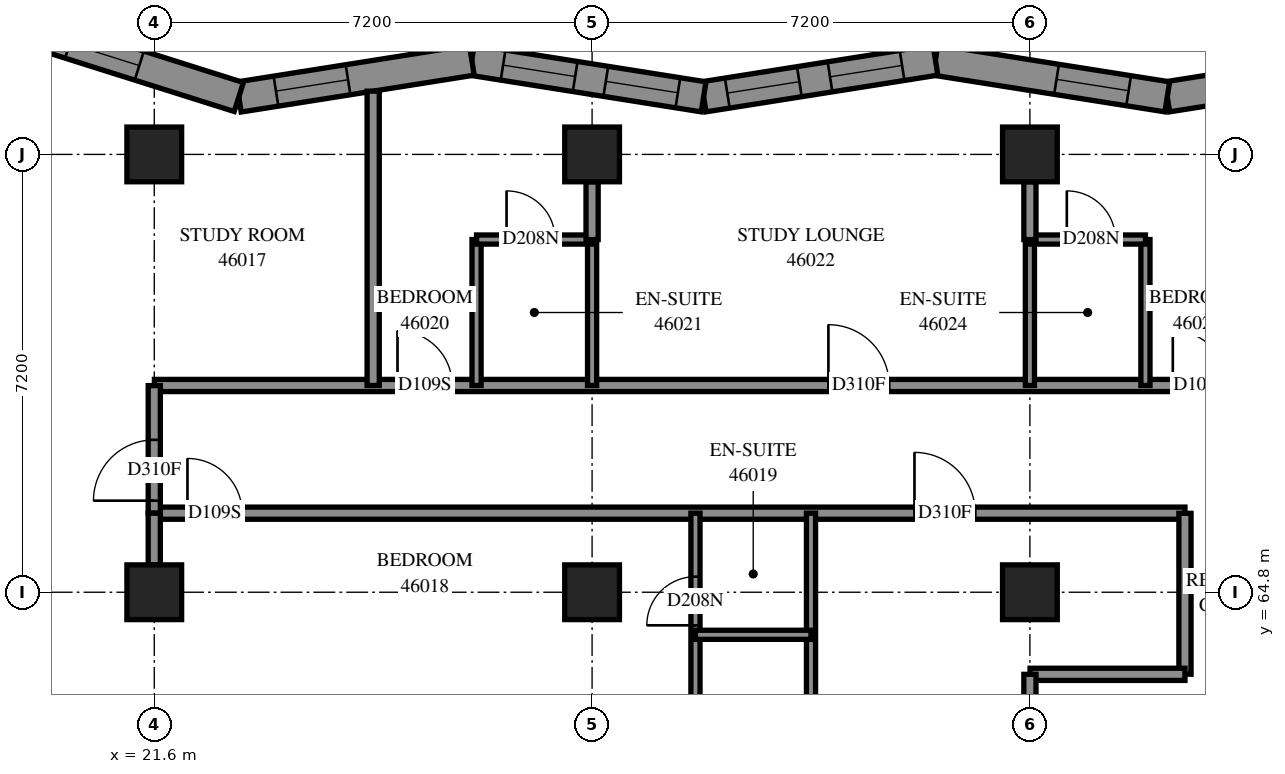
"""IFC4 building model, lengths in metres.
Left out: names, types, materials, properties, quantities, classifications, styles, units other than length and angle.
Written with IfcOpenShell. Run it as: python <this file> out.ifc"""

import sys

from ifc_helpers import new_model, si_unit, direction, frame, frame_2d, origin, origin_2d, place, context, subcontext, project, spatial, polyline, rectangle, outline, extrude, element, fill, save


model = new_model("IFC4")
c1 = context("Model", 3, precision=1e-05, world=origin(), true_north=direction((0.0, 1.0)))
c2 = subcontext(c1, "Body", "Model", "MODEL_VIEW")
j1 = project(units=[si_unit("LENGTHUNIT", "METRE"), si_unit("PLANEANGLEUNIT", "RADIAN")], contexts=[c1])
p1 = place(None, origin())
s1 = spatial("IfcSite", under=j1, at=p1, CompositionType="ELEMENT")
p2 = place(p1, origin())
s2 = spatial("IfcBuilding", under=s1, at=p2, CompositionType="ELEMENT")
p3 = place(p2, frame((0.0, 0.0, 169.4)))
s3 = spatial("IfcBuildingStorey", under=s2, at=p3, CompositionType="ELEMENT", Elevation=169.4)
for number, where, z_axis, x_axis in (
    (1, (21.6, 64.8, 0.0), (0.0, 0.0, 1.0), (1.0, 0.0, 0.0)),
    (2, (21.6, 72.0, 0.0), (0.0, 0.0, 1.0), (1.0, 0.0, 0.0)),
    (3, (28.8, 64.8, 0.0), (0.0, 0.0, 1.0), (1.0, 0.0, 0.0)),
    (4, (28.8, 72.0, 0.0), (0.0, 0.0, 1.0), (1.0, 0.0, 0.0)),
    (5, (36.0, 64.8, 0.0), (0.0, 0.0, 1.0), (1.0, 0.0, 0.0)),
    (6, (36.0, 72.0, 0.0), (0.0, 0.0, 1.0), (1.0, 0.0, 0.0)),
):
    element("IfcColumn", number, at=place(p3, frame(where, z_axis=z_axis, x_axis=x_axis)), inside=s3, PredefinedType="COLUMN", context=c2, shape_type="SweptSolid", body=[
        extrude(rectangle(XDim=0.9, YDim=0.9, at=origin_2d()), origin(), (0.0, 0.0, 1.0), 3.1),
    ])
p4 = place(p3, frame((42.071, 73.55, 0.0), z_axis=(0.0, 0.0, 1.0), x_axis=(-0.9877213372, -0.1562259905, 0.0)))
e7 = element("IfcWall", 7, at=p4, inside=s3, PredefinedType="SOLIDWALL", context=c2, shape_type="SweptSolid", body=[
    extrude(outline(polyline([(-0.04, -0.25), (3.82, -0.25), (3.899, 0.25), (0.04, 0.25), (-0.04, -0.25)])), origin(), (0.0, 0.0, 1.0), 3.1),
])
p5 = place(p4, frame((0.771, 0.0, 0.45)))
e8 = element("IfcOpeningElement", 8, at=p5, cuts=e7, PredefinedType="OPENING", context=c2, shape_type="SweptSolid", body=[
    extrude(rectangle(XDim=1.2, YDim=2.5, at=frame_2d((0.6, 1.25))), frame((0.0, 0.26, 0.0), z_axis=(0.0, -1.0, 0.0), x_axis=(1.0, 0.0, 0.0)), (0.0, 0.0, 1.0), 0.52),
])
p6 = place(p3, frame((38.259, 72.947, 0.0), z_axis=(0.0, 0.0, 1.0), x_axis=(-0.9877213372, 0.1562259905, 0.0)))
e9 = element("IfcWall", 9, at=p6, inside=s3, PredefinedType="SOLIDWALL", context=c2, shape_type="SweptSolid", body=[
    extrude(outline(polyline([(0.04, -0.25), (3.899, -0.25), (3.82, 0.25), (-0.04, 0.25), (0.04, -0.25)])), origin(), (0.0, 0.0, 1.0), 3.1),
])
p7 = place(p6, frame((0.643, 0.0, 0.45)))
e10 = element("IfcOpeningElement", 10, at=p7, cuts=e9, PredefinedType="OPENING", context=c2, shape_type="SweptSolid", body=[
    extrude(rectangle(XDim=1.2, YDim=2.5, at=frame_2d((0.6, 1.25))), frame((0.0, 0.26, 0.0), z_axis=(0.0, -1.0, 0.0), x_axis=(1.0, 0.0, 0.0)), (0.0, 0.0, 1.0), 0.52),
])
p8 = place(p3, frame((34.447, 73.55, 0.0), z_axis=(0.0, 0.0, 1.0), x_axis=(-0.9877213372, -0.1562259905, 0.0)))
e11 = element("IfcWall", 11, at=p8, inside=s3, PredefinedType="SOLIDWALL", context=c2, shape_type="SweptSolid", body=[
    extrude(outline(polyline([(-0.04, -0.25), (3.82, -0.25), (3.899, 0.25), (0.04, 0.25), (-0.04, -0.25)])), origin(), (0.0, 0.0, 1.0), 3.1),
])
p9 = place(p8, frame((0.556, 0.0, 0.45)))
e12 = element("IfcOpeningElement", 12, at=p9, cuts=e11, PredefinedType="OPENING", context=c2, shape_type="SweptSolid", body=[
    extrude(rectangle(XDim=1.2, YDim=2.5, at=frame_2d((0.6, 1.25))), frame((0.0, 0.26, 0.0), z_axis=(0.0, -1.0, 0.0), x_axis=(1.0, 0.0, 0.0)), (0.0, 0.0, 1.0), 0.52),
])
p10 = place(p8, frame((2.266, 0.0, 0.45)))
e13 = element("IfcOpeningElement", 13, at=p10, cuts=e11, PredefinedType="OPENING", context=c2, shape_type="SweptSolid", body=[
    extrude(rectangle(XDim=1.2, YDim=2.5, at=frame_2d((0.6, 1.25))), frame((0.0, 0.26, 0.0), z_axis=(0.0, -1.0, 0.0), x_axis=(1.0, 0.0, 0.0)), (0.0, 0.0, 1.0), 0.52),
])
p11 = place(p3, frame((30.634, 72.947, 0.0), z_axis=(0.0, 0.0, 1.0), x_axis=(-0.9877213372, 0.1562259905, 0.0)))
e14 = element("IfcWall", 14, at=p11, inside=s3, PredefinedType="SOLIDWALL", context=c2, shape_type="SweptSolid", body=[
    extrude(outline(polyline([(0.04, -0.25), (3.899, -0.25), (3.82, 0.25), (-0.04, 0.25), (0.04, -0.25)])), origin(), (0.0, 0.0, 1.0), 3.1),
])
p12 = place(p11, frame((0.428, 0.0, 0.45)))
e15 = element("IfcOpeningElement", 15, at=p12, cuts=e14, PredefinedType="OPENING", context=c2, shape_type="SweptSolid", body=[
    extrude(rectangle(XDim=1.2, YDim=2.5, at=frame_2d((0.6, 1.25))), frame((0.0, 0.26, 0.0), z_axis=(0.0, -1.0, 0.0), x_axis=(1.0, 0.0, 0.0)), (0.0, 0.0, 1.0), 0.52),
])
p13 = place(p11, frame((2.139, 0.0, 0.45)))
e16 = element("IfcOpeningElement", 16, at=p13, cuts=e14, PredefinedType="OPENING", context=c2, shape_type="SweptSolid", body=[
    extrude(rectangle(XDim=1.2, YDim=2.5, at=frame_2d((0.6, 1.25))), frame((0.0, 0.26, 0.0), z_axis=(0.0, -1.0, 0.0), x_axis=(1.0, 0.0, 0.0)), (0.0, 0.0, 1.0), 0.52),
])
p14 = place(p3, frame((26.822, 73.55, 0.0), z_axis=(0.0, 0.0, 1.0), x_axis=(-0.9877221729, -0.1562207065, 0.0)))
e17 = element("IfcWall", 17, at=p14, inside=s3, PredefinedType="SOLIDWALL", context=c2, shape_type="SweptSolid", body=[
    extrude(outline(polyline([(-0.04, -0.25), (3.82, -0.25), (3.938, 0.25), (0.04, 0.25), (-0.04, -0.25)])), origin(), (0.0, 0.0, 1.0), 3.1),
])
p15 = place(p14, frame((2.061, 0.0, 0.45)))
e18 = element("IfcOpeningElement", 18, at=p15, cuts=e17, PredefinedType="OPENING", context=c2, shape_type="SweptSolid", body=[
    extrude(rectangle(XDim=1.2, YDim=2.5, at=frame_2d((0.6, 1.25))), frame((0.0, 0.26, 0.0), z_axis=(0.0, -1.0, 0.0), x_axis=(1.0, 0.0, 0.0)), (0.0, 0.0, 1.0), 0.52),
])
p16 = place(p3, frame((22.99, 72.944, 0.0), z_axis=(0.0, 0.0, 1.0), x_axis=(-0.9536473183, 0.3009265562, 0.0)))
e19 = element("IfcWall", 19, at=p16, inside=s3, PredefinedType="SOLIDWALL", context=c2, shape_type="SweptSolid", body=[
    extrude(outline(polyline([(0.059, -0.25), (4.057, -0.25), (3.374, 0.25), (-0.059, 0.25), (0.059, -0.25)])), origin(), (0.0, 0.0, 1.0), 3.1),
])
p17 = place(p16, frame((1.716, 0.0, 0.45)))
e20 = element("IfcOpeningElement", 20, at=p17, cuts=e19, PredefinedType="OPENING", context=c2, shape_type="SweptSolid", body=[
    extrude(rectangle(XDim=1.2, YDim=2.5, at=frame_2d((0.6, 1.25))), frame((0.0, 0.26, 0.0), z_axis=(0.0, -1.0, 0.0), x_axis=(1.0, 0.0, 0.0)), (0.0, 0.0, 1.0), 0.52),
])
p18 = place(p3, frame((21.602, 68.2, 0.0), z_axis=(0.0, 0.0, 1.0), x_axis=(1.0, 0.0, 0.0)))
e21 = element("IfcWall", 21, at=p18, inside=s3, PredefinedType="PARTITIONING", context=c2, shape_type="SweptSolid", body=[
    extrude(rectangle(XDim=19.048, YDim=0.2, at=frame_2d((9.524, 0.0))), origin(), (0.0, 0.0, 1.0), 3.1),
])
p19 = place(p18, frame((3.998, 0.0, 0.0)))
e22 = element("IfcOpeningElement", 22, at=p19, cuts=e21, PredefinedType="OPENING", context=c2, shape_type="SweptSolid", body=[
    extrude(rectangle(XDim=0.9, YDim=2.1, at=frame_2d((0.45, 1.05))), frame((0.0, 0.11, 0.0), z_axis=(0.0, -1.0, 0.0), x_axis=(1.0, 0.0, 0.0)), (0.0, 0.0, 1.0), 0.22),
])
p20 = place(p18, frame((11.084, 0.0, 0.0)))
e23 = element("IfcOpeningElement", 23, at=p20, cuts=e21, PredefinedType="OPENING", context=c2, shape_type="SweptSolid", body=[
    extrude(rectangle(XDim=1.0, YDim=2.1, at=frame_2d((0.5, 1.05))), frame((0.0, 0.11, 0.0), z_axis=(0.0, -1.0, 0.0), x_axis=(1.0, 0.0, 0.0)), (0.0, 0.0, 1.0), 0.22),
])
p21 = place(p18, frame((16.748, 0.0, 0.0)))
e24 = element("IfcOpeningElement", 24, at=p21, cuts=e21, PredefinedType="OPENING", context=c2, shape_type="SweptSolid", body=[
    extrude(rectangle(XDim=0.9, YDim=2.1, at=frame_2d((0.45, 1.05))), frame((0.0, 0.11, 0.0), z_axis=(0.0, -1.0, 0.0), x_axis=(1.0, 0.0, 0.0)), (0.0, 0.0, 1.0), 0.22),
])
p22 = place(p3, frame((21.6, 66.1, 0.0), z_axis=(0.0, 0.0, 1.0), x_axis=(1.0, 0.0, 0.0)))
e25 = element("IfcWall", 25, at=p22, inside=s3, PredefinedType="PARTITIONING", context=c2, shape_type="SweptSolid", body=[
    extrude(rectangle(XDim=16.95, YDim=0.2, at=frame_2d((8.475, 0.0))), origin(), (0.0, 0.0, 1.0), 3.1),
])
p23 = place(p22, frame((0.546, 0.0, 0.0)))
e26 = element("IfcOpeningElement", 26, at=p23, cuts=e25, PredefinedType="OPENING", context=c2, shape_type="SweptSolid", body=[
    extrude(rectangle(XDim=0.9, YDim=2.1, at=frame_2d((0.45, 1.05))), frame((0.0, 0.11, 0.0), z_axis=(0.0, -1.0, 0.0), x_axis=(1.0, 0.0, 0.0)), (0.0, 0.0, 1.0), 0.22),
])
p24 = place(p22, frame((12.502, 0.0, 0.0)))
e27 = element("IfcOpeningElement", 27, at=p24, cuts=e25, PredefinedType="OPENING", context=c2, shape_type="SweptSolid", body=[
    extrude(rectangle(XDim=1.0, YDim=2.1, at=frame_2d((0.5, 1.05))), frame((0.0, 0.11, 0.0), z_axis=(0.0, -1.0, 0.0), x_axis=(1.0, 0.0, 0.0)), (0.0, 0.0, 1.0), 0.22),
])
p25 = place(p3, frame((25.2, 68.2, 0.0), z_axis=(0.0, 0.0, 1.0), x_axis=(0.0, 1.0, 0.0)))
e28 = element("IfcWall", 28, at=p25, inside=s3, PredefinedType="PARTITIONING", context=c2, shape_type="SweptSolid", body=[
    extrude(rectangle(XDim=4.84, YDim=0.2, at=frame_2d((2.42, 0.0))), origin(), (0.0, 0.0, 1.0), 3.1),
])
p26 = place(p3, frame((32.4, 62.897, 0.0), z_axis=(0.0, 0.0, 1.0), x_axis=(0.0, 1.0, 0.0)))
e29 = element("IfcWall", 29, at=p26, inside=s3, PredefinedType="PARTITIONING", context=c2, shape_type="SweptSolid", body=[
    extrude(rectangle(XDim=3.203, YDim=0.15, at=frame_2d((1.601, 0.0))), origin(), (0.0, 0.0, 1.0), 3.1),
])
p27 = place(p3, frame((30.5, 62.897, 0.0), z_axis=(0.0, 0.0, 1.0), x_axis=(0.0, 1.0, 0.0)))
e30 = element("IfcWall", 30, at=p27, inside=s3, PredefinedType="PARTITIONING", context=c2, shape_type="SweptSolid", body=[
    extrude(rectangle(XDim=3.203, YDim=0.15, at=frame_2d((1.601, 0.0))), origin(), (0.0, 0.0, 1.0), 3.1),
])
p28 = place(p27, frame((1.359, 0.0, 0.0)))
e31 = element("IfcOpeningElement", 31, at=p28, cuts=e30, PredefinedType="OPENING", context=c2, shape_type="SweptSolid", body=[
    extrude(rectangle(XDim=0.8, YDim=2.1, at=frame_2d((0.4, 1.05))), frame((0.0, 0.085, 0.0), z_axis=(0.0, -1.0, 0.0), x_axis=(1.0, 0.0, 0.0)), (0.0, 0.0, 1.0), 0.17),
])
p29 = place(p3, frame((38.55, 63.452, 0.0), z_axis=(0.0, 0.0, 1.0), x_axis=(0.0, 1.0, 0.0)))
e32 = element("IfcWall", 32, at=p29, inside=s3, PredefinedType="PARTITIONING", context=c2, shape_type="SweptSolid", body=[
    extrude(rectangle(XDim=2.646, YDim=0.2, at=frame_2d((1.323, 0.0))), origin(), (0.0, 0.0, 1.0), 3.1),
])
p30 = place(p3, frame((36.002, 63.45, 0.0), z_axis=(0.0, 0.0, 1.0), x_axis=(1.0, 0.0, 0.0)))
e33 = element("IfcWall", 33, at=p30, inside=s3, PredefinedType="PARTITIONING", context=c2, shape_type="SweptSolid", body=[
    extrude(rectangle(XDim=2.548, YDim=0.2, at=frame_2d((1.274, 0.0))), origin(), (0.0, 0.0, 1.0), 3.1),
])
for number, where, z_axis, x_axis in (
    (34, (26.9, 68.2, 0.0), (0.0, 0.0, 1.0), (0.0, 1.0, 0.0)),
    (35, (28.8, 68.2, 0.0), (0.0, 0.0, 1.0), (0.0, 1.0, 0.0)),
    (36, (37.9, 68.2, 0.0), (0.0, 0.0, 1.0), (0.0, 1.0, 0.0)),
    (37, (36.0, 68.2, 0.0), (0.0, 0.0, 1.0), (0.0, 1.0, 0.0)),
):
    element("IfcWall", number, at=place(p3, frame(where, z_axis=z_axis, x_axis=x_axis)), inside=s3, PredefinedType="PARTITIONING", context=c2, shape_type="SweptSolid", body=[
        extrude(rectangle(XDim=2.4, YDim=0.15, at=frame_2d((1.2, 0.0))), origin(), (0.0, 0.0, 1.0), 3.1),
    ])
p31 = place(p3, frame((36.0, 61.35, 0.0), z_axis=(0.0, 0.0, 1.0), x_axis=(0.0, 1.0, 0.0)))
e38 = element("IfcWall", 38, at=p31, inside=s3, PredefinedType="PARTITIONING", context=c2, shape_type="SweptSolid", body=[
    extrude(rectangle(XDim=2.1, YDim=0.2, at=frame_2d((1.05, 0.0))), origin(), (0.0, 0.0, 1.0), 2.6),
])
p32 = place(p3, frame((21.6, 66.1, 0.0), z_axis=(0.0, 0.0, 1.0), x_axis=(0.0, 1.0, 0.0)))
e39 = element("IfcWall", 39, at=p32, inside=s3, PredefinedType="PARTITIONING", context=c2, shape_type="SweptSolid", body=[
    extrude(rectangle(XDim=2.098, YDim=0.2, at=frame_2d((1.049, 0.0))), origin(), (0.0, 0.0, 1.0), 2.6),
])
p33 = place(p32, frame((0.206, 0.0, 0.0)))
e40 = element("IfcOpeningElement", 40, at=p33, cuts=e39, PredefinedType="OPENING", context=c2, shape_type="SweptSolid", body=[
    extrude(rectangle(XDim=1.0, YDim=2.1, at=frame_2d((0.5, 1.05))), frame((0.0, 0.11, 0.0), z_axis=(0.0, -1.0, 0.0), x_axis=(1.0, 0.0, 0.0)), (0.0, 0.0, 1.0), 0.22),
])
p34 = place(p3, frame((26.9, 70.6, 0.0), z_axis=(0.0, 0.0, 1.0), x_axis=(1.0, 0.0, 0.0)))
e41 = element("IfcWall", 41, at=p34, inside=s3, PredefinedType="PARTITIONING", context=c2, shape_type="SweptSolid", body=[
    extrude(rectangle(XDim=1.9, YDim=0.15, at=frame_2d((0.95, 0.0))), origin(), (0.0, 0.0, 1.0), 3.1),
])
p35 = place(p34, frame((0.493, 0.0, 0.0)))
e42 = element("IfcOpeningElement", 42, at=p35, cuts=e41, PredefinedType="OPENING", context=c2, shape_type="SweptSolid", body=[
    extrude(rectangle(XDim=0.8, YDim=2.1, at=frame_2d((0.4, 1.05))), frame((0.0, 0.085, 0.0), z_axis=(0.0, -1.0, 0.0), x_axis=(1.0, 0.0, 0.0)), (0.0, 0.0, 1.0), 0.17),
])
p36 = place(p3, frame((36.0, 70.6, 0.0), z_axis=(0.0, 0.0, 1.0), x_axis=(1.0, 0.0, 0.0)))
e43 = element("IfcWall", 43, at=p36, inside=s3, PredefinedType="PARTITIONING", context=c2, shape_type="SweptSolid", body=[
    extrude(rectangle(XDim=1.9, YDim=0.15, at=frame_2d((0.95, 0.0))), origin(), (0.0, 0.0, 1.0), 3.1),
])
p37 = place(p36, frame((0.607, 0.0, 0.0)))
e44 = element("IfcOpeningElement", 44, at=p37, cuts=e43, PredefinedType="OPENING", context=c2, shape_type="SweptSolid", body=[
    extrude(rectangle(XDim=0.8, YDim=2.1, at=frame_2d((0.4, 1.05))), frame((0.0, 0.085, 0.0), z_axis=(0.0, -1.0, 0.0), x_axis=(1.0, 0.0, 0.0)), (0.0, 0.0, 1.0), 0.17),
])
p38 = place(p3, frame((30.5, 64.1, 0.0), z_axis=(0.0, 0.0, 1.0), x_axis=(1.0, 0.0, 0.0)))
e45 = element("IfcWall", 45, at=p38, inside=s3, PredefinedType="PARTITIONING", context=c2, shape_type="SweptSolid", body=[
    extrude(rectangle(XDim=1.9, YDim=0.15, at=frame_2d((0.95, 0.0))), origin(), (0.0, 0.0, 1.0), 3.1),
])
for number, where, z_axis, x_axis in (
    (46, (28.8, 70.6, 0.0), (0.0, 0.0, 1.0), (0.0, 1.0, 0.0)),
    (47, (36.0, 70.6, 0.0), (0.0, 0.0, 1.0), (0.0, 1.0, 0.0)),
):
    element("IfcWall", number, at=place(p3, frame(where, z_axis=z_axis, x_axis=x_axis)), inside=s3, PredefinedType="PARTITIONING", context=c2, shape_type="SweptSolid", body=[
        extrude(rectangle(XDim=0.95, YDim=0.2, at=frame_2d((0.475, 0.0))), origin(), (0.0, 0.0, 1.0), 3.1),
    ])
p39 = place(p3, frame((21.6, 65.25, 0.0), z_axis=(0.0, 0.0, 1.0), x_axis=(0.0, 1.0, 0.0)))
e48 = element("IfcWall", 48, at=p39, inside=s3, PredefinedType="PARTITIONING", context=c2, shape_type="SweptSolid", body=[
    extrude(rectangle(XDim=0.85, YDim=0.2, at=frame_2d((0.425, 0.0))), origin(), (0.0, 0.0, 1.0), 2.6),
])
p40 = place(p7, origin())
e49 = element("IfcWindow", 49, at=p40, inside=s3, PartitioningType="SINGLE_PANEL", PredefinedType="WINDOW", context=c2, shape_type="SweptSolid", body=[
    extrude(rectangle(XDim=1.2, YDim=2.5, at=frame_2d((0.6, 1.25))), frame((0.0, 0.18, 0.0), z_axis=(0.0, -1.0, 0.0), x_axis=(1.0, 0.0, 0.0)), (0.0, 0.0, 1.0), 0.06),
])
fill(e10, e49)
p41 = place(p9, origin())
e50 = element("IfcWindow", 50, at=p41, inside=s3, PartitioningType="SINGLE_PANEL", PredefinedType="WINDOW", context=c2, shape_type="SweptSolid", body=[
    extrude(rectangle(XDim=1.2, YDim=2.5, at=frame_2d((0.6, 1.25))), frame((0.0, 0.18, 0.0), z_axis=(0.0, -1.0, 0.0), x_axis=(1.0, 0.0, 0.0)), (0.0, 0.0, 1.0), 0.06),
])
fill(e12, e50)
p42 = place(p10, origin())
e51 = element("IfcWindow", 51, at=p42, inside=s3, PartitioningType="SINGLE_PANEL", PredefinedType="WINDOW", context=c2, shape_type="SweptSolid", body=[
    extrude(rectangle(XDim=1.2, YDim=2.5, at=frame_2d((0.6, 1.25))), frame((0.0, 0.18, 0.0), z_axis=(0.0, -1.0, 0.0), x_axis=(1.0, 0.0, 0.0)), (0.0, 0.0, 1.0), 0.06),
])
fill(e13, e51)
p43 = place(p12, origin())
e52 = element("IfcWindow", 52, at=p43, inside=s3, PartitioningType="SINGLE_PANEL", PredefinedType="WINDOW", context=c2, shape_type="SweptSolid", body=[
    extrude(rectangle(XDim=1.2, YDim=2.5, at=frame_2d((0.6, 1.25))), frame((0.0, 0.18, 0.0), z_axis=(0.0, -1.0, 0.0), x_axis=(1.0, 0.0, 0.0)), (0.0, 0.0, 1.0), 0.06),
])
fill(e15, e52)
p44 = place(p13, origin())
e53 = element("IfcWindow", 53, at=p44, inside=s3, PartitioningType="SINGLE_PANEL", PredefinedType="WINDOW", context=c2, shape_type="SweptSolid", body=[
    extrude(rectangle(XDim=1.2, YDim=2.5, at=frame_2d((0.6, 1.25))), frame((0.0, 0.18, 0.0), z_axis=(0.0, -1.0, 0.0), x_axis=(1.0, 0.0, 0.0)), (0.0, 0.0, 1.0), 0.06),
])
fill(e16, e53)
p45 = place(p15, origin())
e54 = element("IfcWindow", 54, at=p45, inside=s3, PartitioningType="SINGLE_PANEL", PredefinedType="WINDOW", context=c2, shape_type="SweptSolid", body=[
    extrude(rectangle(XDim=1.2, YDim=2.5, at=frame_2d((0.6, 1.25))), frame((0.0, 0.18, 0.0), z_axis=(0.0, -1.0, 0.0), x_axis=(1.0, 0.0, 0.0)), (0.0, 0.0, 1.0), 0.06),
])
fill(e18, e54)
p46 = place(p17, origin())
e55 = element("IfcWindow", 55, at=p46, inside=s3, PartitioningType="SINGLE_PANEL", PredefinedType="WINDOW", context=c2, shape_type="SweptSolid", body=[
    extrude(rectangle(XDim=1.2, YDim=2.5, at=frame_2d((0.6, 1.25))), frame((0.0, 0.18, 0.0), z_axis=(0.0, -1.0, 0.0), x_axis=(1.0, 0.0, 0.0)), (0.0, 0.0, 1.0), 0.06),
])
fill(e20, e55)
p47 = place(p33, origin())
e56 = element("IfcDoor", 56, at=p47, inside=s3, OperationType="SINGLE_SWING_RIGHT", PredefinedType="DOOR", context=c2, shape_type="SweptSolid", body=[
    extrude(rectangle(XDim=1.0, YDim=2.1, at=frame_2d((0.5, 1.05))), frame((0.0, 0.025, 0.0), z_axis=(0.0, -1.0, 0.0), x_axis=(1.0, 0.0, 0.0)), (0.0, 0.0, 1.0), 0.05),
])
fill(e40, e56)
p48 = place(p23, origin())
e57 = element("IfcDoor", 57, at=p48, inside=s3, OperationType="SINGLE_SWING_LEFT", PredefinedType="DOOR", context=c2, shape_type="SweptSolid", body=[
    extrude(rectangle(XDim=0.9, YDim=2.1, at=frame_2d((0.45, 1.05))), frame((0.0, 0.025, 0.0), z_axis=(0.0, -1.0, 0.0), x_axis=(1.0, 0.0, 0.0)), (0.0, 0.0, 1.0), 0.05),
])
fill(e26, e57)
p49 = place(p28, origin())
e58 = element("IfcDoor", 58, at=p49, inside=s3, OperationType="SINGLE_SWING_RIGHT", PredefinedType="DOOR", context=c2, shape_type="SweptSolid", body=[
    extrude(rectangle(XDim=0.8, YDim=2.1, at=frame_2d((0.4, 1.05))), frame((0.0, 0.025, 0.0), z_axis=(0.0, -1.0, 0.0), x_axis=(1.0, 0.0, 0.0)), (0.0, 0.0, 1.0), 0.05),
])
fill(e31, e58)
p50 = place(p19, origin())
e59 = element("IfcDoor", 59, at=p50, inside=s3, OperationType="SINGLE_SWING_LEFT", PredefinedType="DOOR", context=c2, shape_type="SweptSolid", body=[
    extrude(rectangle(XDim=0.9, YDim=2.1, at=frame_2d((0.45, 1.05))), frame((0.0, 0.025, 0.0), z_axis=(0.0, -1.0, 0.0), x_axis=(1.0, 0.0, 0.0)), (0.0, 0.0, 1.0), 0.05),
])
fill(e22, e59)
p51 = place(p35, origin())
e60 = element("IfcDoor", 60, at=p51, inside=s3, OperationType="SINGLE_SWING_RIGHT", PredefinedType="DOOR", context=c2, shape_type="SweptSolid", body=[
    extrude(rectangle(XDim=0.8, YDim=2.1, at=frame_2d((0.4, 1.05))), frame((0.0, 0.025, 0.0), z_axis=(0.0, -1.0, 0.0), x_axis=(1.0, 0.0, 0.0)), (0.0, 0.0, 1.0), 0.05),
])
fill(e42, e60)
p52 = place(p20, origin())
e61 = element("IfcDoor", 61, at=p52, inside=s3, OperationType="SINGLE_SWING_RIGHT", PredefinedType="DOOR", context=c2, shape_type="SweptSolid", body=[
    extrude(rectangle(XDim=1.0, YDim=2.1, at=frame_2d((0.5, 1.05))), frame((0.0, 0.025, 0.0), z_axis=(0.0, -1.0, 0.0), x_axis=(1.0, 0.0, 0.0)), (0.0, 0.0, 1.0), 0.05),
])
fill(e23, e61)
p53 = place(p21, origin())
e62 = element("IfcDoor", 62, at=p53, inside=s3, OperationType="SINGLE_SWING_RIGHT", PredefinedType="DOOR", context=c2, shape_type="SweptSolid", body=[
    extrude(rectangle(XDim=0.9, YDim=2.1, at=frame_2d((0.45, 1.05))), frame((0.0, 0.025, 0.0), z_axis=(0.0, -1.0, 0.0), x_axis=(1.0, 0.0, 0.0)), (0.0, 0.0, 1.0), 0.05),
])
fill(e24, e62)
p54 = place(p37, origin())
e63 = element("IfcDoor", 63, at=p54, inside=s3, OperationType="SINGLE_SWING_RIGHT", PredefinedType="DOOR", context=c2, shape_type="SweptSolid", body=[
    extrude(rectangle(XDim=0.8, YDim=2.1, at=frame_2d((0.4, 1.05))), frame((0.0, 0.025, 0.0), z_axis=(0.0, -1.0, 0.0), x_axis=(1.0, 0.0, 0.0)), (0.0, 0.0, 1.0), 0.05),
])
fill(e44, e63)
p55 = place(p24, origin())
e64 = element("IfcDoor", 64, at=p55, inside=s3, OperationType="SINGLE_SWING_RIGHT", PredefinedType="DOOR", context=c2, shape_type="SweptSolid", body=[
    extrude(rectangle(XDim=1.0, YDim=2.1, at=frame_2d((0.5, 1.05))), frame((0.0, 0.025, 0.0), z_axis=(0.0, -1.0, 0.0), x_axis=(1.0, 0.0, 0.0)), (0.0, 0.0, 1.0), 0.05),
])
fill(e27, e64)
save(model, sys.argv[1])
